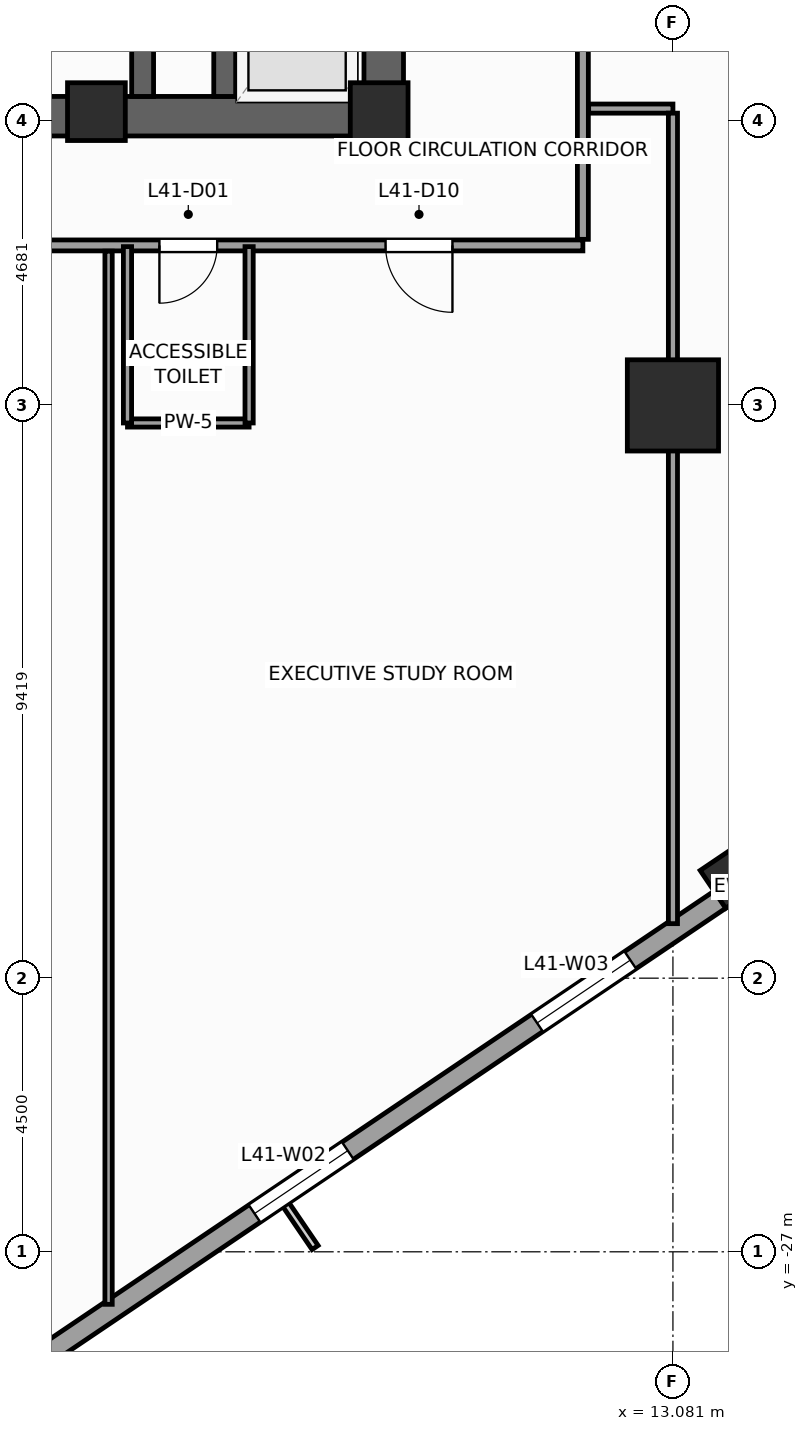
"""IFC4 building model, lengths in metres.
Left out: names, types, materials, properties, quantities, classifications, styles, units other than length and angle.
Written with IfcOpenShell. Run it as: python <this file> out.ifc"""

import sys

from ifc_helpers import new_model, si_unit, direction, frame, frame_2d, origin, origin_2d, place, context, subcontext, project, spatial, rectangle, extrude, source, transform, mapped, element, fill, save


model = new_model("IFC4")
c1 = context("Model", 3, precision=1e-05, world=origin(), true_north=direction((0.0, 1.0)))
c2 = subcontext(c1, "Body", "Model", "MODEL_VIEW")
j1 = project(units=[si_unit("LENGTHUNIT", "METRE"), si_unit("PLANEANGLEUNIT", "RADIAN")], contexts=[c1])
p1 = place(None, origin())
s1 = spatial("IfcSite", under=j1, at=p1, CompositionType="ELEMENT")
p2 = place(p1, origin())
s2 = spatial("IfcBuilding", under=s1, at=p2, CompositionType="ELEMENT")
p3 = place(p2, frame((0.0, 0.0, 172.4)))
s3 = spatial("IfcBuildingStorey", under=s2, at=p3, CompositionType="ELEMENT", Elevation=172.4)
p4 = place(p3, frame((-8.65, -8.325, 0.0), z_axis=(0.0, 0.0, 1.0), x_axis=(1.0, 0.0, 0.0)))
e1 = element("IfcWall", 1, at=p4, inside=s3, PredefinedType="SHEAR", context=c2, shape_type="SweptSolid", body=[
    extrude(rectangle(XDim=17.3, YDim=0.65, at=frame_2d((8.65, 0.0))), origin(), (0.0, 0.0, 1.0), 4.0),
])
p5 = place(p4, frame((8.0, 0.0, 0.0)))
e2 = element("IfcOpeningElement", 2, at=p5, cuts=e1, PredefinedType="OPENING", context=c2, shape_type="SweptSolid", body=[
    extrude(rectangle(XDim=1.3, YDim=2.2, at=frame_2d((0.65, 1.1))), frame((0.0, 0.335, 0.0), z_axis=(0.0, -1.0, 0.0), x_axis=(1.0, 0.0, 0.0)), (0.0, 0.0, 1.0), 0.67),
])
p6 = place(p3, frame((8.325, -8.0, 0.0), z_axis=(0.0, 0.0, 1.0), x_axis=(0.0, 1.0, 0.0)))
e3 = element("IfcWall", 3, at=p6, inside=s3, PredefinedType="SHEAR", context=c2, shape_type="SweptSolid", body=[
    extrude(rectangle(XDim=16.0, YDim=0.65, at=frame_2d((8.0, 0.0))), origin(), (0.0, 0.0, 1.0), 4.0),
])
p7 = place(p6, frame((4.69, 0.0, 0.0)))
e4 = element("IfcOpeningElement", 4, at=p7, cuts=e3, PredefinedType="OPENING", context=c2, shape_type="SweptSolid", body=[
    extrude(rectangle(XDim=1.3, YDim=2.2, at=frame_2d((0.65, 1.1))), frame((0.0, 0.335, 0.0), z_axis=(0.0, -1.0, 0.0), x_axis=(1.0, 0.0, 0.0)), (0.0, 0.0, 1.0), 0.67),
])
p8 = place(p3, frame((4.36, -8.0, 0.0), z_axis=(0.0, 0.0, 1.0), x_axis=(0.0, 1.0, 0.0)))
e5 = element("IfcWall", 5, at=p8, inside=s3, PredefinedType="SHEAR", context=c2, shape_type="SweptSolid", body=[
    extrude(rectangle(XDim=16.0, YDim=0.36, at=frame_2d((8.0, 0.0))), origin(), (0.0, 0.0, 1.0), 4.0),
])
p9 = place(p3, frame((5.71, -8.0, 0.0), z_axis=(0.0, 0.0, 1.0), x_axis=(0.0, 1.0, 0.0)))
e6 = element("IfcWall", 6, at=p9, inside=s3, PredefinedType="SHEAR", context=c2, shape_type="SweptSolid", body=[
    extrude(rectangle(XDim=2.54, YDim=0.36, at=frame_2d((1.27, 0.0))), origin(), (0.0, 0.0, 1.0), 4.0),
])
m1 = source(origin(), c2, "Body", "SweptSolid", [
    extrude(rectangle(XDim=0.95, YDim=0.95, at=origin_2d()), origin(), (0.0, 0.0, 1.0), 4.0),
])
for number, where, z_axis, x_axis in (
    (7, (8.25, -8.25, 0.0), (0.0, 0.0, 1.0), (1.0, 0.0, 0.0)),
    (8, (3.6, -8.25, 0.0), (0.0, 0.0, 1.0), (1.0, 0.0, 0.0)),
):
    element("IfcColumn", number, at=place(p3, frame(where, z_axis=z_axis, x_axis=x_axis)), inside=s3, PredefinedType="PILASTER", context=c2, shape_type="MappedRepresentation", body=[
        mapped(m1, transform((0.0, 0.0, 0.0), scale=1.0)),
    ])
m2 = source(origin(), c2, "Body", "SweptSolid", [
    extrude(rectangle(XDim=1.5, YDim=1.5, at=origin_2d()), origin(), (0.0, 0.0, 1.0), 4.0),
])
p10 = place(p3, frame((13.081, -13.081, 0.0), z_axis=(0.0, 0.0, 1.0), x_axis=(1.0, 0.0, 0.0)))
e9 = element("IfcColumn", 9, at=p10, inside=s3, PredefinedType="COLUMN", context=c2, shape_type="MappedRepresentation", body=[
    mapped(m2, transform((0.0, 0.0, 0.0), scale=1.0)),
])
m3 = source(origin(), c2, "Body", "SweptSolid", [
    extrude(rectangle(XDim=0.75, YDim=0.75, at=origin_2d()), origin(), (0.0, 0.0, 1.0), 4.0),
])
p11 = place(p3, frame((14.05, -20.83, 0.0), z_axis=(0.0, 0.0, 1.0), x_axis=(0.829037572555, 0.559192903471, 0.0)))
e10 = element("IfcColumn", 10, at=p11, inside=s3, PredefinedType="COLUMN", context=c2, shape_type="MappedRepresentation", body=[
    mapped(m3, transform((0.0, 0.0, 0.0), scale=1.0)),
])
p12 = place(p3, frame((-2.972, -32.558, 0.0), z_axis=(0.0, 0.0, 1.0), x_axis=(0.829036218961, 0.559194910251, 0.0)))
e11 = element("IfcWall", 11, at=p12, inside=s3, PredefinedType="STANDARD", context=c2, shape_type="SweptSolid", body=[
    extrude(rectangle(XDim=41.34, YDim=0.34, at=frame_2d((20.67, 0.0))), origin(), (0.0, 0.0, 1.0), 3.04),
])
p13 = place(p12, frame((25.745, 0.0, 0.0)))
e12 = element("IfcOpeningElement", 12, at=p13, cuts=e11, PredefinedType="OPENING", context=c2, shape_type="SweptSolid", body=[
    extrude(rectangle(XDim=1.05, YDim=2.25, at=frame_2d((0.525, 1.125))), frame((0.0, 0.18, 0.0), z_axis=(0.0, -1.0, 0.0), x_axis=(1.0, 0.0, 0.0)), (0.0, 0.0, 1.0), 0.36),
])
p14 = place(p12, frame((4.261, 0.0, 0.56)))
e13 = element("IfcOpeningElement", 13, at=p14, cuts=e11, PredefinedType="OPENING", context=c2, shape_type="SweptSolid", body=[
    extrude(rectangle(XDim=1.4, YDim=2.4, at=frame_2d((0.7, 1.2))), frame((0.0, 0.18, 0.0), z_axis=(0.0, -1.0, 0.0), x_axis=(1.0, 0.0, 0.0)), (0.0, 0.0, 1.0), 0.36),
])
p15 = place(p12, frame((11.064, 0.0, 0.61)))
e14 = element("IfcOpeningElement", 14, at=p15, cuts=e11, PredefinedType="OPENING", context=c2, shape_type="SweptSolid", body=[
    extrude(rectangle(XDim=1.85, YDim=2.35, at=frame_2d((0.925, 1.175))), frame((0.0, 0.18, 0.0), z_axis=(0.0, -1.0, 0.0), x_axis=(1.0, 0.0, 0.0)), (0.0, 0.0, 1.0), 0.36),
])
p16 = place(p12, frame((16.668, 0.0, 0.61)))
e15 = element("IfcOpeningElement", 15, at=p16, cuts=e11, PredefinedType="OPENING", context=c2, shape_type="SweptSolid", body=[
    extrude(rectangle(XDim=1.85, YDim=2.35, at=frame_2d((0.925, 1.175))), frame((0.0, 0.18, 0.0), z_axis=(0.0, -1.0, 0.0), x_axis=(1.0, 0.0, 0.0)), (0.0, 0.0, 1.0), 0.36),
])
p17 = place(p12, frame((27.936, 0.0, 0.61)))
e16 = element("IfcOpeningElement", 16, at=p17, cuts=e11, PredefinedType="OPENING", context=c2, shape_type="SweptSolid", body=[
    extrude(rectangle(XDim=1.85, YDim=2.35, at=frame_2d((0.925, 1.175))), frame((0.0, 0.18, 0.0), z_axis=(0.0, -1.0, 0.0), x_axis=(1.0, 0.0, 0.0)), (0.0, 0.0, 1.0), 0.36),
])
p18 = place(p12, frame((34.852, 0.0, 0.56)))
e17 = element("IfcOpeningElement", 17, at=p18, cuts=e11, PredefinedType="OPENING", context=c2, shape_type="SweptSolid", body=[
    extrude(rectangle(XDim=1.4, YDim=2.4, at=frame_2d((0.7, 1.2))), frame((0.0, 0.18, 0.0), z_axis=(0.0, -1.0, 0.0), x_axis=(1.0, 0.0, 0.0)), (0.0, 0.0, 1.0), 0.36),
])
p19 = place(p3, frame((-10.45, -10.45, 0.0), z_axis=(0.0, 0.0, 1.0), x_axis=(1.0, 0.0, 0.0)))
e18 = element("IfcWall", 18, at=p19, inside=s3, PredefinedType="PARTITIONING", context=c2, shape_type="SweptSolid", body=[
    extrude(rectangle(XDim=22.05, YDim=0.18, at=frame_2d((11.025, 0.0))), origin(), (0.0, 0.0, 1.0), 3.74),
])
p20 = place(p19, frame((15.086, 0.0, 0.0)))
e19 = element("IfcOpeningElement", 19, at=p20, cuts=e18, PredefinedType="OPENING", context=c2, shape_type="SweptSolid", body=[
    extrude(rectangle(XDim=0.95, YDim=2.1, at=frame_2d((0.475, 1.05))), frame((0.0, 0.1, 0.0), z_axis=(0.0, -1.0, 0.0), x_axis=(1.0, 0.0, 0.0)), (0.0, 0.0, 1.0), 0.2),
])
p21 = place(p19, frame((7.611, 0.0, 0.0)))
e20 = element("IfcOpeningElement", 20, at=p21, cuts=e18, PredefinedType="OPENING", context=c2, shape_type="SweptSolid", body=[
    extrude(rectangle(XDim=0.95, YDim=2.1, at=frame_2d((0.475, 1.05))), frame((0.0, 0.1, 0.0), z_axis=(0.0, -1.0, 0.0), x_axis=(1.0, 0.0, 0.0)), (0.0, 0.0, 1.0), 0.2),
])
p22 = place(p19, frame((2.939, 0.0, 0.0)))
e21 = element("IfcOpeningElement", 21, at=p22, cuts=e18, PredefinedType="OPENING", context=c2, shape_type="SweptSolid", body=[
    extrude(rectangle(XDim=1.1, YDim=2.2, at=frame_2d((0.55, 1.1))), frame((0.0, 0.1, 0.0), z_axis=(0.0, -1.0, 0.0), x_axis=(1.0, 0.0, 0.0)), (0.0, 0.0, 1.0), 0.2),
])
p23 = place(p19, frame((11.175, 0.0, 0.0)))
e22 = element("IfcOpeningElement", 22, at=p23, cuts=e18, PredefinedType="OPENING", context=c2, shape_type="SweptSolid", body=[
    extrude(rectangle(XDim=1.1, YDim=2.2, at=frame_2d((0.55, 1.1))), frame((0.0, 0.1, 0.0), z_axis=(0.0, -1.0, 0.0), x_axis=(1.0, 0.0, 0.0)), (0.0, 0.0, 1.0), 0.2),
])
p24 = place(p19, frame((18.805, 0.0, 0.0)))
e23 = element("IfcOpeningElement", 23, at=p24, cuts=e18, PredefinedType="OPENING", context=c2, shape_type="SweptSolid", body=[
    extrude(rectangle(XDim=1.1, YDim=2.2, at=frame_2d((0.55, 1.1))), frame((0.0, 0.1, 0.0), z_axis=(0.0, -1.0, 0.0), x_axis=(1.0, 0.0, 0.0)), (0.0, 0.0, 1.0), 0.2),
])
p25 = place(p3, frame((11.6, -10.35, 0.0), z_axis=(0.0, 0.0, 1.0), x_axis=(0.0, 1.0, 0.0)))
e24 = element("IfcWall", 24, at=p25, inside=s3, PredefinedType="PARTITIONING", context=c2, shape_type="SweptSolid", body=[
    extrude(rectangle(XDim=11.95, YDim=0.18, at=frame_2d((5.975, 0.0))), origin(), (0.0, 0.0, 1.0), 3.74),
])
p26 = place(p25, frame((9.911, 0.0, 0.0)))
e25 = element("IfcOpeningElement", 25, at=p26, cuts=e24, PredefinedType="OPENING", context=c2, shape_type="SweptSolid", body=[
    extrude(rectangle(XDim=1.1, YDim=2.2, at=frame_2d((0.55, 1.1))), frame((0.0, 0.1, 0.0), z_axis=(0.0, -1.0, 0.0), x_axis=(1.0, 0.0, 0.0)), (0.0, 0.0, 1.0), 0.2),
])
p27 = place(p25, frame((4.1, 0.0, 0.0)))
e26 = element("IfcOpeningElement", 26, at=p27, cuts=e24, PredefinedType="OPENING", context=c2, shape_type="SweptSolid", body=[
    extrude(rectangle(XDim=1.1, YDim=2.2, at=frame_2d((0.55, 1.1))), frame((0.0, 0.1, 0.0), z_axis=(0.0, -1.0, 0.0), x_axis=(1.0, 0.0, 0.0)), (0.0, 0.0, 1.0), 0.2),
])
p28 = place(p25, frame((7.675, 0.0, 0.0)))
e27 = element("IfcOpeningElement", 27, at=p28, cuts=e24, PredefinedType="OPENING", context=c2, shape_type="SweptSolid", body=[
    extrude(rectangle(XDim=1.1, YDim=2.2, at=frame_2d((0.55, 1.1))), frame((0.0, 0.1, 0.0), z_axis=(0.0, -1.0, 0.0), x_axis=(1.0, 0.0, 0.0)), (0.0, 0.0, 1.0), 0.2),
])
p29 = place(p3, frame((3.8, -27.864, 0.0), z_axis=(0.0, 0.0, 1.0), x_axis=(0.0, 1.0, 0.0)))
e28 = element("IfcWall", 28, at=p29, inside=s3, PredefinedType="PARTITIONING", context=c2, shape_type="SweptSolid", body=[
    extrude(rectangle(XDim=17.319, YDim=0.12, at=frame_2d((8.659, 0.0))), origin(), (0.0, 0.0, 1.0), 3.74),
])
p30 = place(p3, frame((11.695, -8.2, 0.0), z_axis=(0.0, 0.0, 1.0), x_axis=(1.0, 0.0, 0.0)))
e29 = element("IfcWall", 29, at=p30, inside=s3, PredefinedType="PARTITIONING", context=c2, shape_type="SweptSolid", body=[
    extrude(rectangle(XDim=1.386, YDim=0.15, at=frame_2d((0.693, 0.0))), origin(), (0.0, 0.0, 1.0), 3.74),
])
p31 = place(p3, frame((13.081, -8.275, 0.0), z_axis=(0.0, 0.0, 1.0), x_axis=(0.0, -1.0, 0.0)))
e30 = element("IfcWall", 30, at=p31, inside=s3, PredefinedType="PARTITIONING", context=c2, shape_type="SweptSolid", body=[
    extrude(rectangle(XDim=13.329, YDim=0.15, at=frame_2d((6.664, 0.0))), origin(), (0.0, 0.0, 1.0), 2.84),
])
p32 = place(p3, frame((4.111, -13.37, 0.0), z_axis=(0.0, 0.0, 1.0), x_axis=(1.0, 0.0, 0.0)))
e31 = element("IfcWall", 31, at=p32, inside=s3, PredefinedType="PARTITIONING", context=c2, shape_type="SweptSolid", body=[
    extrude(rectangle(XDim=2.0, YDim=0.135, at=frame_2d((1.0, 0.0))), origin(), (0.0, 0.0, 1.0), 2.84),
])
for number, where, z_axis, x_axis in (
    (32, (6.111, -13.37, 0.0), (0.0, 0.0, 1.0), (0.0, 1.0, 0.0)),
    (33, (4.111, -13.37, 0.0), (0.0, 0.0, 1.0), (0.0, 1.0, 0.0)),
):
    element("IfcWall", number, at=place(p3, frame(where, z_axis=z_axis, x_axis=x_axis)), inside=s3, PredefinedType="PARTITIONING", context=c2, shape_type="SweptSolid", body=[
        extrude(rectangle(XDim=2.9, YDim=0.135, at=frame_2d((1.45, 0.0))), origin(), (0.0, 0.0, 1.0), 3.74),
    ])
m4 = source(origin(), c2, "Body", "SweptSolid", [
    extrude(rectangle(XDim=1.85, YDim=2.35, at=frame_2d((0.925, 1.175))), frame((0.0, 0.03, 0.0), z_axis=(0.0, -1.0, 0.0), x_axis=(1.0, 0.0, 0.0)), (0.0, 0.0, 1.0), 0.06),
])
p33 = place(p15, origin())
e34 = element("IfcWindow", 34, at=p33, inside=s3, PartitioningType="SINGLE_PANEL", PredefinedType="WINDOW", context=c2, shape_type="MappedRepresentation", body=[
    mapped(m4, transform((0.0, 0.0, 0.0), scale=1.0)),
])
fill(e14, e34)
p34 = place(p16, origin())
e35 = element("IfcWindow", 35, at=p34, inside=s3, PartitioningType="SINGLE_PANEL", PredefinedType="WINDOW", context=c2, shape_type="MappedRepresentation", body=[
    mapped(m4, transform((0.0, 0.0, 0.0), scale=1.0)),
])
fill(e15, e35)
m5 = source(origin(), c2, "Body", "SweptSolid", [
    extrude(rectangle(XDim=0.95, YDim=2.1, at=frame_2d((0.475, 1.05))), frame((0.0, 0.025, 0.0), z_axis=(0.0, -1.0, 0.0), x_axis=(1.0, 0.0, 0.0)), (0.0, 0.0, 1.0), 0.05),
])
p35 = place(p20, frame((0.95, 0.0, 0.0), z_axis=(0.0, 0.0, 1.0), x_axis=(-1.0, 0.0, 0.0)))
e36 = element("IfcDoor", 36, at=p35, inside=s3, OperationType="SINGLE_SWING_LEFT", PredefinedType="DOOR", context=c2, shape_type="MappedRepresentation", body=[
    mapped(m5, transform((0.0, 0.0, 0.0), scale=1.0)),
])
fill(e19, e36)
m6 = source(origin(), c2, "Body", "SweptSolid", [
    extrude(rectangle(XDim=1.1, YDim=2.2, at=frame_2d((0.55, 1.1))), frame((0.0, 0.025, 0.0), z_axis=(0.0, -1.0, 0.0), x_axis=(1.0, 0.0, 0.0)), (0.0, 0.0, 1.0), 0.05),
])
p36 = place(p24, frame((1.1, 0.0, 0.0), z_axis=(0.0, 0.0, 1.0), x_axis=(-1.0, 0.0, 0.0)))
e37 = element("IfcDoor", 37, at=p36, inside=s3, OperationType="SINGLE_SWING_RIGHT", PredefinedType="DOOR", context=c2, shape_type="MappedRepresentation", body=[
    mapped(m6, transform((0.0, 0.0, 0.0), scale=1.0)),
])
fill(e23, e37)
save(model, sys.argv[1])
